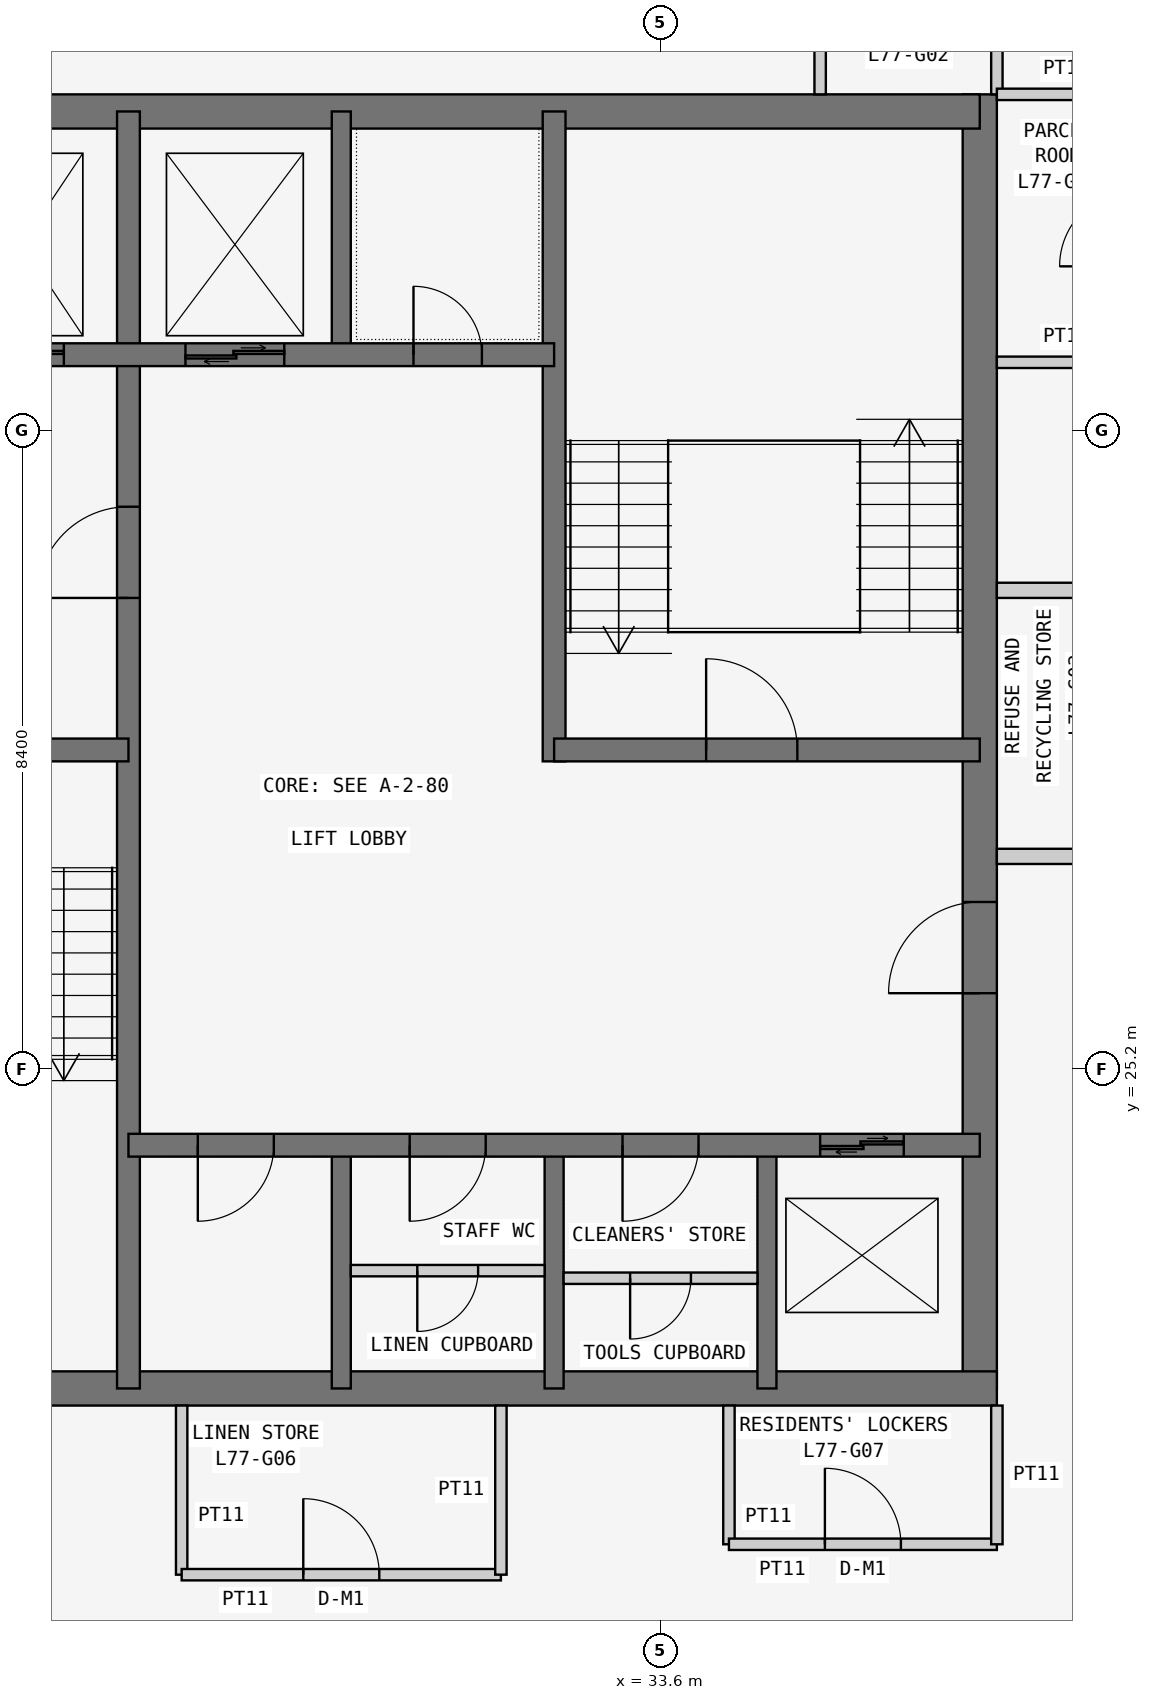
"""IFC4 building model, lengths in metres.
Left out: names, types, materials, properties, quantities, classifications, styles, units other than length and angle.
Written with IfcOpenShell. Run it as: python <this file> out.ifc"""

import sys

from ifc_helpers import new_model, si_unit, direction, frame, frame_2d, origin, place, context, subcontext, project, spatial, rectangle, extrude, element, fill, save


model = new_model("IFC4")
c1 = context("Model", 3, precision=1e-05, world=origin(), true_north=direction((0.0, 1.0)))
c2 = subcontext(c1, "Body", "Model", "MODEL_VIEW")
j1 = project(units=[si_unit("LENGTHUNIT", "METRE"), si_unit("PLANEANGLEUNIT", "RADIAN")], contexts=[c1])
p1 = place(None, origin())
s1 = spatial("IfcSite", under=j1, at=p1, CompositionType="ELEMENT")
p2 = place(p1, origin())
s2 = spatial("IfcBuilding", under=s1, at=p2, CompositionType="ELEMENT")
p3 = place(p2, frame((0.0, 0.0, 293.7)))
s3 = spatial("IfcBuildingStorey", under=s2, at=p3, CompositionType="ELEMENT", Elevation=293.7)
p4 = place(p3, frame((21.0, 21.0, 0.0), z_axis=(0.0, 0.0, 1.0), x_axis=(1.0, 0.0, 0.0)))
e1 = element("IfcWall", 1, at=p4, inside=s3, PredefinedType="SHEAR", context=c2, shape_type="SweptSolid", body=[
    extrude(rectangle(XDim=17.025, YDim=0.45, at=frame_2d((8.512, 0.0))), origin(), (0.0, 0.0, 1.0), 3.6),
])
p5 = place(p3, frame((37.8, 21.0, 0.0), z_axis=(0.0, 0.0, 1.0), x_axis=(0.0, 1.0, 0.0)))
e2 = element("IfcWall", 2, at=p5, inside=s3, PredefinedType="SHEAR", context=c2, shape_type="SweptSolid", body=[
    extrude(rectangle(XDim=17.025, YDim=0.45, at=frame_2d((8.512, 0.0))), origin(), (0.0, 0.0, 1.0), 3.6),
])
p6 = place(p5, frame((5.2, 0.0, 0.0)))
e3 = element("IfcOpeningElement", 3, at=p6, cuts=e2, PredefinedType="OPENING", context=c2, shape_type="SweptSolid", body=[
    extrude(rectangle(XDim=1.2, YDim=2.1, at=frame_2d((0.6, 1.05))), frame((0.0, 0.235, 0.0), z_axis=(0.0, -1.0, 0.0), x_axis=(1.0, 0.0, 0.0)), (0.0, 0.0, 1.0), 0.47),
])
p7 = place(p3, frame((37.8, 37.8, 0.0), z_axis=(0.0, 0.0, 1.0), x_axis=(-1.0, 0.0, 0.0)))
e4 = element("IfcWall", 4, at=p7, inside=s3, PredefinedType="SHEAR", context=c2, shape_type="SweptSolid", body=[
    extrude(rectangle(XDim=17.025, YDim=0.45, at=frame_2d((8.513, 0.0))), origin(), (0.0, 0.0, 1.0), 3.6),
])
p8 = place(p3, frame((26.6, 21.0, 0.0), z_axis=(0.0, 0.0, 1.0), x_axis=(0.0, 1.0, 0.0)))
e5 = element("IfcWall", 5, at=p8, inside=s3, PredefinedType="SHEAR", context=c2, shape_type="SweptSolid", body=[
    extrude(rectangle(XDim=16.8, YDim=0.3, at=frame_2d((8.4, 0.0))), origin(), (0.0, 0.0, 1.0), 3.6),
])
p9 = place(p8, frame((10.4, 0.0, 0.0)))
e6 = element("IfcOpeningElement", 6, at=p9, cuts=e5, PredefinedType="OPENING", context=c2, shape_type="SweptSolid", body=[
    extrude(rectangle(XDim=1.2, YDim=2.1, at=frame_2d((0.6, 1.05))), frame((0.0, 0.16, 0.0), z_axis=(0.0, -1.0, 0.0), x_axis=(1.0, 0.0, 0.0)), (0.0, 0.0, 1.0), 0.32),
])
p10 = place(p3, frame((21.0, 29.4, 0.0), z_axis=(0.0, 0.0, 1.0), x_axis=(1.0, 0.0, 0.0)))
e7 = element("IfcWall", 7, at=p10, inside=s3, PredefinedType="SHEAR", context=c2, shape_type="SweptSolid", body=[
    extrude(rectangle(XDim=5.6, YDim=0.3, at=frame_2d((2.8, 0.0))), origin(), (0.0, 0.0, 1.0), 3.6),
])
p11 = place(p10, frame((2.3, 0.0, 0.0)))
e8 = element("IfcOpeningElement", 8, at=p11, cuts=e7, PredefinedType="OPENING", context=c2, shape_type="SweptSolid", body=[
    extrude(rectangle(XDim=1.2, YDim=2.1, at=frame_2d((0.6, 1.05))), frame((0.0, 0.16, 0.0), z_axis=(0.0, -1.0, 0.0), x_axis=(1.0, 0.0, 0.0)), (0.0, 0.0, 1.0), 0.32),
])
p12 = place(p3, frame((21.0, 34.6, 0.0), z_axis=(0.0, 0.0, 1.0), x_axis=(1.0, 0.0, 0.0)))
e9 = element("IfcWall", 9, at=p12, inside=s3, PredefinedType="SHEAR", context=c2, shape_type="SweptSolid", body=[
    extrude(rectangle(XDim=11.2, YDim=0.3, at=frame_2d((5.6, 0.0))), origin(), (0.0, 0.0, 1.0), 3.6),
])
p13 = place(p12, frame((9.35, 0.0, 0.0)))
e10 = element("IfcOpeningElement", 10, at=p13, cuts=e9, PredefinedType="OPENING", context=c2, shape_type="SweptSolid", body=[
    extrude(rectangle(XDim=0.9, YDim=2.1, at=frame_2d((0.45, 1.05))), frame((0.0, 0.16, 0.0), z_axis=(0.0, -1.0, 0.0), x_axis=(1.0, 0.0, 0.0)), (0.0, 0.0, 1.0), 0.32),
])
p14 = place(p12, frame((1.0, 0.0, 0.0)))
e11 = element("IfcOpeningElement", 11, at=p14, cuts=e9, PredefinedType="OPENING", context=c2, shape_type="SweptSolid", body=[
    extrude(rectangle(XDim=1.1, YDim=2.1, at=frame_2d((0.55, 1.05))), frame((0.0, 0.16, 0.0), z_axis=(0.0, -1.0, 0.0), x_axis=(1.0, 0.0, 0.0)), (0.0, 0.0, 1.0), 0.32),
])
p15 = place(p12, frame((3.65, 0.0, 0.0)))
e12 = element("IfcOpeningElement", 12, at=p15, cuts=e9, PredefinedType="OPENING", context=c2, shape_type="SweptSolid", body=[
    extrude(rectangle(XDim=1.1, YDim=2.1, at=frame_2d((0.55, 1.05))), frame((0.0, 0.16, 0.0), z_axis=(0.0, -1.0, 0.0), x_axis=(1.0, 0.0, 0.0)), (0.0, 0.0, 1.0), 0.32),
])
p16 = place(p12, frame((6.35, 0.0, 0.0)))
e13 = element("IfcOpeningElement", 13, at=p16, cuts=e9, PredefinedType="OPENING", context=c2, shape_type="SweptSolid", body=[
    extrude(rectangle(XDim=1.3, YDim=2.1, at=frame_2d((0.65, 1.05))), frame((0.0, 0.16, 0.0), z_axis=(0.0, -1.0, 0.0), x_axis=(1.0, 0.0, 0.0)), (0.0, 0.0, 1.0), 0.32),
])
p17 = place(p3, frame((26.6, 24.2, 0.0), z_axis=(0.0, 0.0, 1.0), x_axis=(1.0, 0.0, 0.0)))
e14 = element("IfcWall", 14, at=p17, inside=s3, PredefinedType="SHEAR", context=c2, shape_type="SweptSolid", body=[
    extrude(rectangle(XDim=11.2, YDim=0.3, at=frame_2d((5.6, 0.0))), origin(), (0.0, 0.0, 1.0), 3.6),
])
p18 = place(p17, frame((0.913, 0.0, 0.0)))
e15 = element("IfcOpeningElement", 15, at=p18, cuts=e14, PredefinedType="OPENING", context=c2, shape_type="SweptSolid", body=[
    extrude(rectangle(XDim=1.0, YDim=2.1, at=frame_2d((0.5, 1.05))), frame((0.0, 0.16, 0.0), z_axis=(0.0, -1.0, 0.0), x_axis=(1.0, 0.0, 0.0)), (0.0, 0.0, 1.0), 0.32),
])
p19 = place(p17, frame((3.7, 0.0, 0.0)))
e16 = element("IfcOpeningElement", 16, at=p19, cuts=e14, PredefinedType="OPENING", context=c2, shape_type="SweptSolid", body=[
    extrude(rectangle(XDim=1.0, YDim=2.1, at=frame_2d((0.5, 1.05))), frame((0.0, 0.16, 0.0), z_axis=(0.0, -1.0, 0.0), x_axis=(1.0, 0.0, 0.0)), (0.0, 0.0, 1.0), 0.32),
])
p20 = place(p17, frame((6.5, 0.0, 0.0)))
e17 = element("IfcOpeningElement", 17, at=p20, cuts=e14, PredefinedType="OPENING", context=c2, shape_type="SweptSolid", body=[
    extrude(rectangle(XDim=1.0, YDim=2.1, at=frame_2d((0.5, 1.05))), frame((0.0, 0.16, 0.0), z_axis=(0.0, -1.0, 0.0), x_axis=(1.0, 0.0, 0.0)), (0.0, 0.0, 1.0), 0.32),
])
p21 = place(p17, frame((9.1, 0.0, 0.0)))
e18 = element("IfcOpeningElement", 18, at=p21, cuts=e14, PredefinedType="OPENING", context=c2, shape_type="SweptSolid", body=[
    extrude(rectangle(XDim=1.1, YDim=2.1, at=frame_2d((0.55, 1.05))), frame((0.0, 0.16, 0.0), z_axis=(0.0, -1.0, 0.0), x_axis=(1.0, 0.0, 0.0)), (0.0, 0.0, 1.0), 0.32),
])
p22 = place(p3, frame((32.2, 29.25, 0.0), z_axis=(0.0, 0.0, 1.0), x_axis=(0.0, 1.0, 0.0)))
e19 = element("IfcWall", 19, at=p22, inside=s3, PredefinedType="SHEAR", context=c2, shape_type="SweptSolid", body=[
    extrude(rectangle(XDim=8.55, YDim=0.3, at=frame_2d((4.275, 0.0))), origin(), (0.0, 0.0, 1.0), 3.6),
])
p23 = place(p3, frame((32.2, 29.4, 0.0), z_axis=(0.0, 0.0, 1.0), x_axis=(1.0, 0.0, 0.0)))
e20 = element("IfcWall", 20, at=p23, inside=s3, PredefinedType="SHEAR", context=c2, shape_type="SweptSolid", body=[
    extrude(rectangle(XDim=5.6, YDim=0.3, at=frame_2d((2.8, 0.0))), origin(), (0.0, 0.0, 1.0), 3.6),
])
p24 = place(p23, frame((2.0, 0.0, 0.0)))
e21 = element("IfcOpeningElement", 21, at=p24, cuts=e20, PredefinedType="OPENING", context=c2, shape_type="SweptSolid", body=[
    extrude(rectangle(XDim=1.2, YDim=2.1, at=frame_2d((0.6, 1.05))), frame((0.0, 0.16, 0.0), z_axis=(0.0, -1.0, 0.0), x_axis=(1.0, 0.0, 0.0)), (0.0, 0.0, 1.0), 0.32),
])
for number, where, z_axis, x_axis in (
    (22, (29.4, 21.0, 0.0), (0.0, 0.0, 1.0), (0.0, 1.0, 0.0)),
    (23, (32.2, 21.0, 0.0), (0.0, 0.0, 1.0), (0.0, 1.0, 0.0)),
    (24, (35.0, 21.0, 0.0), (0.0, 0.0, 1.0), (0.0, 1.0, 0.0)),
    (25, (29.4, 34.6, 0.0), (0.0, 0.0, 1.0), (0.0, 1.0, 0.0)),
):
    element("IfcWall", number, at=place(p3, frame(where, z_axis=z_axis, x_axis=x_axis)), inside=s3, PredefinedType="SHEAR", context=c2, shape_type="SweptSolid", body=[
        extrude(rectangle(XDim=3.2, YDim=0.25, at=frame_2d((1.6, 0.0))), origin(), (0.0, 0.0, 1.0), 3.6),
    ])
for number, where, z_axis, x_axis in (
    (26, (38.025, 38.025, 0.0), (0.0, 0.0, 1.0), (0.0, 1.0, 0.0)),
    (27, (35.7, 40.6, 0.0), (0.0, 0.0, 1.0), (0.0, -1.0, 0.0)),
):
    element("IfcWall", number, at=place(p3, frame(where, z_axis=z_axis, x_axis=x_axis)), inside=s3, PredefinedType="PARTITIONING", context=c2, shape_type="SweptSolid", body=[
        extrude(rectangle(XDim=2.575, YDim=0.15, at=frame_2d((1.288, 0.0))), origin(), (0.0, 0.0, 1.0), 3.45),
    ])
for number, where, z_axis, x_axis in (
    (28, (38.025, 28.0, 0.0), (0.0, 0.0, 1.0), (1.0, 0.0, 0.0)),
    (29, (40.6, 31.5, 0.0), (0.0, 0.0, 1.0), (-1.0, 0.0, 0.0)),
):
    element("IfcWall", number, at=place(p3, frame(where, z_axis=z_axis, x_axis=x_axis)), inside=s3, PredefinedType="PARTITIONING", context=c2, shape_type="SweptSolid", body=[
        extrude(rectangle(XDim=2.575, YDim=0.2, at=frame_2d((1.288, 0.0))), origin(), (0.0, 0.0, 1.0), 3.45),
    ])
for number, where, z_axis, x_axis in (
    (30, (38.025, 34.5, 0.0), (0.0, 0.0, 1.0), (1.0, 0.0, 0.0)),
    (31, (39.85, 38.025, 0.0), (0.0, 0.0, 1.0), (-1.0, 0.0, 0.0)),
):
    element("IfcWall", number, at=place(p3, frame(where, z_axis=z_axis, x_axis=x_axis)), inside=s3, PredefinedType="PARTITIONING", context=c2, shape_type="SweptSolid", body=[
        extrude(rectangle(XDim=1.825, YDim=0.15, at=frame_2d((0.913, 0.0))), origin(), (0.0, 0.0, 1.0), 3.45),
    ])
p25 = place(p3, frame((27.3, 20.775, 0.0), z_axis=(0.0, 0.0, 1.0), x_axis=(0.0, -1.0, 0.0)))
e32 = element("IfcWall", 32, at=p25, inside=s3, PredefinedType="PARTITIONING", context=c2, shape_type="SweptSolid", body=[
    extrude(rectangle(XDim=2.225, YDim=0.15, at=frame_2d((1.112, 0.0))), origin(), (0.0, 0.0, 1.0), 3.45),
])
p26 = place(p3, frame((27.3, 18.55, 0.0), z_axis=(0.0, 0.0, 1.0), x_axis=(1.0, 0.0, 0.0)))
e33 = element("IfcWall", 33, at=p26, inside=s3, PredefinedType="PARTITIONING", context=c2, shape_type="SweptSolid", body=[
    extrude(rectangle(XDim=4.2, YDim=0.15, at=frame_2d((2.1, 0.0))), origin(), (0.0, 0.0, 1.0), 3.45),
])
p27 = place(p26, frame((1.6, 0.0, 0.0)))
e34 = element("IfcOpeningElement", 34, at=p27, cuts=e33, PredefinedType="OPENING", context=c2, shape_type="SweptSolid", body=[
    extrude(rectangle(XDim=1.0, YDim=2.1, at=frame_2d((0.5, 1.05))), frame((0.0, 0.085, 0.0), z_axis=(0.0, -1.0, 0.0), x_axis=(1.0, 0.0, 0.0)), (0.0, 0.0, 1.0), 0.17),
])
p28 = place(p3, frame((31.5, 18.55, 0.0), z_axis=(0.0, 0.0, 1.0), x_axis=(0.0, 1.0, 0.0)))
e35 = element("IfcWall", 35, at=p28, inside=s3, PredefinedType="PARTITIONING", context=c2, shape_type="SweptSolid", body=[
    extrude(rectangle(XDim=2.225, YDim=0.15, at=frame_2d((1.112, 0.0))), origin(), (0.0, 0.0, 1.0), 3.45),
])
p29 = place(p3, frame((34.5, 20.775, 0.0), z_axis=(0.0, 0.0, 1.0), x_axis=(0.0, -1.0, 0.0)))
e36 = element("IfcWall", 36, at=p29, inside=s3, PredefinedType="PARTITIONING", context=c2, shape_type="SweptSolid", body=[
    extrude(rectangle(XDim=1.825, YDim=0.15, at=frame_2d((0.913, 0.0))), origin(), (0.0, 0.0, 1.0), 3.45),
])
p30 = place(p3, frame((34.5, 18.95, 0.0), z_axis=(0.0, 0.0, 1.0), x_axis=(1.0, 0.0, 0.0)))
e37 = element("IfcWall", 37, at=p30, inside=s3, PredefinedType="PARTITIONING", context=c2, shape_type="SweptSolid", body=[
    extrude(rectangle(XDim=3.525, YDim=0.15, at=frame_2d((1.762, 0.0))), origin(), (0.0, 0.0, 1.0), 3.45),
])
p31 = place(p30, frame((1.262, 0.0, 0.0)))
e38 = element("IfcOpeningElement", 38, at=p31, cuts=e37, PredefinedType="OPENING", context=c2, shape_type="SweptSolid", body=[
    extrude(rectangle(XDim=1.0, YDim=2.1, at=frame_2d((0.5, 1.05))), frame((0.0, 0.085, 0.0), z_axis=(0.0, -1.0, 0.0), x_axis=(1.0, 0.0, 0.0)), (0.0, 0.0, 1.0), 0.17),
])
p32 = place(p3, frame((38.025, 18.95, 0.0), z_axis=(0.0, 0.0, 1.0), x_axis=(0.0, 1.0, 0.0)))
e39 = element("IfcWall", 39, at=p32, inside=s3, PredefinedType="PARTITIONING", context=c2, shape_type="SweptSolid", body=[
    extrude(rectangle(XDim=1.825, YDim=0.15, at=frame_2d((0.913, 0.0))), origin(), (0.0, 0.0, 1.0), 3.45),
])
p33 = place(p3, frame((29.525, 22.55, 0.0), z_axis=(0.0, 0.0, 1.0), x_axis=(1.0, 0.0, 0.0)))
e40 = element("IfcWall", 40, at=p33, inside=s3, PredefinedType="PARTITIONING", context=c2, shape_type="SweptSolid", body=[
    extrude(rectangle(XDim=2.55, YDim=0.15, at=frame_2d((1.275, 0.0))), origin(), (0.0, 0.0, 1.0), 3.45),
])
p34 = place(p33, frame((0.875, 0.0, 0.0)))
e41 = element("IfcOpeningElement", 41, at=p34, cuts=e40, PredefinedType="OPENING", context=c2, shape_type="SweptSolid", body=[
    extrude(rectangle(XDim=0.8, YDim=2.1, at=frame_2d((0.4, 1.05))), frame((0.0, 0.085, 0.0), z_axis=(0.0, -1.0, 0.0), x_axis=(1.0, 0.0, 0.0)), (0.0, 0.0, 1.0), 0.17),
])
p35 = place(p3, frame((32.325, 22.45, 0.0), z_axis=(0.0, 0.0, 1.0), x_axis=(1.0, 0.0, 0.0)))
e42 = element("IfcWall", 42, at=p35, inside=s3, PredefinedType="PARTITIONING", context=c2, shape_type="SweptSolid", body=[
    extrude(rectangle(XDim=2.55, YDim=0.15, at=frame_2d((1.275, 0.0))), origin(), (0.0, 0.0, 1.0), 3.45),
])
p36 = place(p35, frame((0.875, 0.0, 0.0)))
e43 = element("IfcOpeningElement", 43, at=p36, cuts=e42, PredefinedType="OPENING", context=c2, shape_type="SweptSolid", body=[
    extrude(rectangle(XDim=0.8, YDim=2.1, at=frame_2d((0.4, 1.05))), frame((0.0, 0.085, 0.0), z_axis=(0.0, -1.0, 0.0), x_axis=(1.0, 0.0, 0.0)), (0.0, 0.0, 1.0), 0.17),
])
p37 = place(p27, origin())
e44 = element("IfcDoor", 44, at=p37, inside=s3, OperationType="SINGLE_SWING_LEFT", PredefinedType="DOOR", context=c2, shape_type="SweptSolid", body=[
    extrude(rectangle(XDim=1.0, YDim=2.1, at=frame_2d((0.5, 1.05))), frame((0.0, 0.025, 0.0), z_axis=(0.0, -1.0, 0.0), x_axis=(1.0, 0.0, 0.0)), (0.0, 0.0, 1.0), 0.05),
])
fill(e34, e44)
p38 = place(p31, origin())
e45 = element("IfcDoor", 45, at=p38, inside=s3, OperationType="SINGLE_SWING_LEFT", PredefinedType="DOOR", context=c2, shape_type="SweptSolid", body=[
    extrude(rectangle(XDim=1.0, YDim=2.1, at=frame_2d((0.5, 1.05))), frame((0.0, 0.025, 0.0), z_axis=(0.0, -1.0, 0.0), x_axis=(1.0, 0.0, 0.0)), (0.0, 0.0, 1.0), 0.05),
])
fill(e38, e45)
p39 = place(p9, origin())
e46 = element("IfcDoor", 46, at=p39, inside=s3, OperationType="SINGLE_SWING_LEFT", PredefinedType="DOOR", context=c2, shape_type="SweptSolid", body=[
    extrude(rectangle(XDim=1.2, YDim=2.1, at=frame_2d((0.6, 1.05))), frame((0.0, 0.025, 0.0), z_axis=(0.0, -1.0, 0.0), x_axis=(1.0, 0.0, 0.0)), (0.0, 0.0, 1.0), 0.05),
])
fill(e6, e46)
p40 = place(p6, origin())
e47 = element("IfcDoor", 47, at=p40, inside=s3, OperationType="SINGLE_SWING_LEFT", PredefinedType="DOOR", context=c2, shape_type="SweptSolid", body=[
    extrude(rectangle(XDim=1.2, YDim=2.1, at=frame_2d((0.6, 1.05))), frame((0.0, 0.025, 0.0), z_axis=(0.0, -1.0, 0.0), x_axis=(1.0, 0.0, 0.0)), (0.0, 0.0, 1.0), 0.05),
])
fill(e3, e47)
p41 = place(p24, origin())
e48 = element("IfcDoor", 48, at=p41, inside=s3, OperationType="SINGLE_SWING_LEFT", PredefinedType="DOOR", context=c2, shape_type="SweptSolid", body=[
    extrude(rectangle(XDim=1.2, YDim=2.1, at=frame_2d((0.6, 1.05))), frame((0.0, 0.025, 0.0), z_axis=(0.0, -1.0, 0.0), x_axis=(1.0, 0.0, 0.0)), (0.0, 0.0, 1.0), 0.05),
])
fill(e21, e48)
p42 = place(p13, origin())
e49 = element("IfcDoor", 49, at=p42, inside=s3, OperationType="SINGLE_SWING_LEFT", PredefinedType="DOOR", context=c2, shape_type="SweptSolid", body=[
    extrude(rectangle(XDim=0.9, YDim=2.1, at=frame_2d((0.45, 1.05))), frame((0.0, 0.025, 0.0), z_axis=(0.0, -1.0, 0.0), x_axis=(1.0, 0.0, 0.0)), (0.0, 0.0, 1.0), 0.05),
])
fill(e10, e49)
p43 = place(p18, frame((1.0, 0.0, 0.0), z_axis=(0.0, 0.0, 1.0), x_axis=(-1.0, 0.0, 0.0)))
e50 = element("IfcDoor", 50, at=p43, inside=s3, OperationType="SINGLE_SWING_RIGHT", PredefinedType="DOOR", context=c2, shape_type="SweptSolid", body=[
    extrude(rectangle(XDim=1.0, YDim=2.1, at=frame_2d((0.5, 1.05))), frame((0.0, 0.025, 0.0), z_axis=(0.0, -1.0, 0.0), x_axis=(1.0, 0.0, 0.0)), (0.0, 0.0, 1.0), 0.05),
])
fill(e15, e50)
p44 = place(p19, frame((1.0, 0.0, 0.0), z_axis=(0.0, 0.0, 1.0), x_axis=(-1.0, 0.0, 0.0)))
e51 = element("IfcDoor", 51, at=p44, inside=s3, OperationType="SINGLE_SWING_RIGHT", PredefinedType="DOOR", context=c2, shape_type="SweptSolid", body=[
    extrude(rectangle(XDim=1.0, YDim=2.1, at=frame_2d((0.5, 1.05))), frame((0.0, 0.025, 0.0), z_axis=(0.0, -1.0, 0.0), x_axis=(1.0, 0.0, 0.0)), (0.0, 0.0, 1.0), 0.05),
])
fill(e16, e51)
p45 = place(p34, frame((0.8, 0.0, 0.0), z_axis=(0.0, 0.0, 1.0), x_axis=(-1.0, 0.0, 0.0)))
e52 = element("IfcDoor", 52, at=p45, inside=s3, OperationType="SINGLE_SWING_RIGHT", PredefinedType="DOOR", context=c2, shape_type="SweptSolid", body=[
    extrude(rectangle(XDim=0.8, YDim=2.1, at=frame_2d((0.4, 1.05))), frame((0.0, 0.025, 0.0), z_axis=(0.0, -1.0, 0.0), x_axis=(1.0, 0.0, 0.0)), (0.0, 0.0, 1.0), 0.05),
])
fill(e41, e52)
p46 = place(p20, frame((1.0, 0.0, 0.0), z_axis=(0.0, 0.0, 1.0), x_axis=(-1.0, 0.0, 0.0)))
e53 = element("IfcDoor", 53, at=p46, inside=s3, OperationType="SINGLE_SWING_RIGHT", PredefinedType="DOOR", context=c2, shape_type="SweptSolid", body=[
    extrude(rectangle(XDim=1.0, YDim=2.1, at=frame_2d((0.5, 1.05))), frame((0.0, 0.025, 0.0), z_axis=(0.0, -1.0, 0.0), x_axis=(1.0, 0.0, 0.0)), (0.0, 0.0, 1.0), 0.05),
])
fill(e17, e53)
p47 = place(p36, frame((0.8, 0.0, 0.0), z_axis=(0.0, 0.0, 1.0), x_axis=(-1.0, 0.0, 0.0)))
e54 = element("IfcDoor", 54, at=p47, inside=s3, OperationType="SINGLE_SWING_RIGHT", PredefinedType="DOOR", context=c2, shape_type="SweptSolid", body=[
    extrude(rectangle(XDim=0.8, YDim=2.1, at=frame_2d((0.4, 1.05))), frame((0.0, 0.025, 0.0), z_axis=(0.0, -1.0, 0.0), x_axis=(1.0, 0.0, 0.0)), (0.0, 0.0, 1.0), 0.05),
])
fill(e43, e54)
p48 = place(p21, origin())
e55 = element("IfcDoor", 55, at=p48, inside=s3, OperationType="DOUBLE_DOOR_SLIDING", PredefinedType="DOOR", context=c2, shape_type="SweptSolid", body=[
    extrude(rectangle(XDim=1.1, YDim=2.1, at=frame_2d((0.55, 1.05))), frame((0.0, 0.025, 0.0), z_axis=(0.0, -1.0, 0.0), x_axis=(1.0, 0.0, 0.0)), (0.0, 0.0, 1.0), 0.05),
])
fill(e18, e55)
p49 = place(p15, origin())
e56 = element("IfcDoor", 56, at=p49, inside=s3, OperationType="DOUBLE_DOOR_SLIDING", PredefinedType="DOOR", context=c2, shape_type="SweptSolid", body=[
    extrude(rectangle(XDim=1.1, YDim=2.1, at=frame_2d((0.55, 1.05))), frame((0.0, 0.025, 0.0), z_axis=(0.0, -1.0, 0.0), x_axis=(1.0, 0.0, 0.0)), (0.0, 0.0, 1.0), 0.05),
])
fill(e12, e56)
p50 = place(p16, origin())
e57 = element("IfcDoor", 57, at=p50, inside=s3, OperationType="DOUBLE_DOOR_SLIDING", PredefinedType="DOOR", context=c2, shape_type="SweptSolid", body=[
    extrude(rectangle(XDim=1.3, YDim=2.1, at=frame_2d((0.65, 1.05))), frame((0.0, 0.025, 0.0), z_axis=(0.0, -1.0, 0.0), x_axis=(1.0, 0.0, 0.0)), (0.0, 0.0, 1.0), 0.05),
])
fill(e13, e57)
save(model, sys.argv[1])
